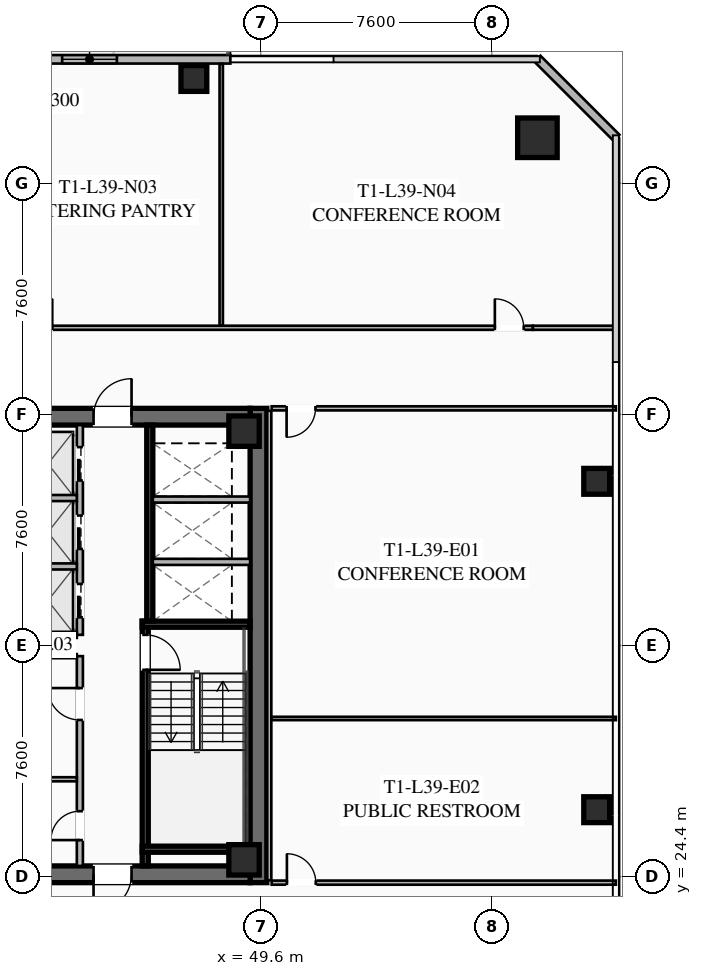
"""IFC4 building model, lengths in metres.
Left out: names, types, materials, properties, quantities, classifications, styles, units other than length and angle.
Written with IfcOpenShell. Run it as: python <this file> out.ifc"""

import sys

from ifc_helpers import new_model, si_unit, direction, frame, frame_2d, origin, origin_2d, place, context, subcontext, project, spatial, rectangle, hollow_rectangle, extrude, element, fill, save


model = new_model("IFC4")
c1 = context("Model", 3, precision=1e-05, world=origin(), true_north=direction((0.0, 1.0)))
c2 = subcontext(c1, "Body", "Model", "MODEL_VIEW")
j1 = project(units=[si_unit("LENGTHUNIT", "METRE"), si_unit("PLANEANGLEUNIT", "RADIAN")], contexts=[c1])
p1 = place(None, origin())
s1 = spatial("IfcSite", under=j1, at=p1, CompositionType="ELEMENT")
p2 = place(p1, origin())
s2 = spatial("IfcBuilding", under=s1, at=p2, CompositionType="ELEMENT")
p3 = place(p2, frame((0.0, 0.0, 146.35)))
s3 = spatial("IfcBuildingStorey", under=s2, at=p3, CompositionType="ELEMENT", Elevation=146.35)
p4 = place(p3, frame((49.525, 39.8, 0.0), z_axis=(0.0, 0.0, 1.0), x_axis=(0.0, -1.0, 0.0)))
e1 = element("IfcWall", 1, at=p4, inside=s3, PredefinedType="SHEAR", context=c2, shape_type="SweptSolid", body=[
    extrude(rectangle(XDim=15.6, YDim=0.55, at=frame_2d((7.8, 0.0))), origin(), (0.0, 0.0, 1.0), 3.55),
])
p5 = place(p3, frame((49.25, 24.475, 0.0), z_axis=(0.0, 0.0, 1.0), x_axis=(-1.0, 0.0, 0.0)))
e2 = element("IfcWall", 2, at=p5, inside=s3, PredefinedType="SHEAR", context=c2, shape_type="SweptSolid", body=[
    extrude(rectangle(XDim=14.5, YDim=0.55, at=frame_2d((7.25, 0.0))), origin(), (0.0, 0.0, 1.0), 3.55),
])
p6 = place(p5, frame((8.95, 0.0, 0.0)))
e3 = element("IfcOpeningElement", 3, at=p6, cuts=e2, PredefinedType="OPENING", context=c2, shape_type="SweptSolid", body=[
    extrude(rectangle(XDim=1.25, YDim=2.25, at=frame_2d((0.625, 1.125))), frame((0.0, 0.285, 0.0), z_axis=(0.0, -1.0, 0.0), x_axis=(1.0, 0.0, 0.0)), (0.0, 0.0, 1.0), 0.57),
])
p7 = place(p5, frame((3.9, 0.0, 0.0)))
e4 = element("IfcOpeningElement", 4, at=p7, cuts=e2, PredefinedType="OPENING", context=c2, shape_type="SweptSolid", body=[
    extrude(rectangle(XDim=1.25, YDim=2.25, at=frame_2d((0.625, 1.125))), frame((0.0, 0.285, 0.0), z_axis=(0.0, -1.0, 0.0), x_axis=(1.0, 0.0, 0.0)), (0.0, 0.0, 1.0), 0.57),
])
p8 = place(p3, frame((34.75, 39.525, 0.0), z_axis=(0.0, 0.0, 1.0), x_axis=(1.0, 0.0, 0.0)))
e5 = element("IfcWall", 5, at=p8, inside=s3, PredefinedType="SHEAR", context=c2, shape_type="SweptSolid", body=[
    extrude(rectangle(XDim=14.5, YDim=0.55, at=frame_2d((7.25, 0.0))), origin(), (0.0, 0.0, 1.0), 3.55),
])
p9 = place(p8, frame((4.3, 0.0, 0.0)))
e6 = element("IfcOpeningElement", 6, at=p9, cuts=e5, PredefinedType="OPENING", context=c2, shape_type="SweptSolid", body=[
    extrude(rectangle(XDim=1.25, YDim=2.25, at=frame_2d((0.625, 1.125))), frame((0.0, 0.285, 0.0), z_axis=(0.0, -1.0, 0.0), x_axis=(1.0, 0.0, 0.0)), (0.0, 0.0, 1.0), 0.57),
])
p10 = place(p8, frame((9.35, 0.0, 0.0)))
e7 = element("IfcOpeningElement", 7, at=p10, cuts=e5, PredefinedType="OPENING", context=c2, shape_type="SweptSolid", body=[
    extrude(rectangle(XDim=1.25, YDim=2.25, at=frame_2d((0.625, 1.125))), frame((0.0, 0.285, 0.0), z_axis=(0.0, -1.0, 0.0), x_axis=(1.0, 0.0, 0.0)), (0.0, 0.0, 1.0), 0.57),
])
for number, where, z_axis, x_axis in (
    (8, (49.05, 24.95, 0.0), (0.0, 0.0, 1.0), (1.0, 0.0, 0.0)),
    (9, (49.05, 39.05, 0.0), (0.0, 0.0, 1.0), (1.0, 0.0, 0.0)),
):
    element("IfcColumn", number, at=place(p3, frame(where, z_axis=z_axis, x_axis=x_axis)), inside=s3, PredefinedType="COLUMN", context=c2, shape_type="SweptSolid", body=[
        extrude(hollow_rectangle(XDim=1.0, YDim=1.0, WallThickness=0.04, at=origin_2d()), origin(), (0.0, 0.0, 1.0), 3.37),
    ])
p11 = place(p3, frame((58.7, 48.7, 0.0), z_axis=(0.0, 0.0, 1.0), x_axis=(1.0, 0.0, 0.0)))
e10 = element("IfcColumn", 10, at=p11, inside=s3, PredefinedType="COLUMN", context=c2, shape_type="SweptSolid", body=[
    extrude(hollow_rectangle(XDim=1.3, YDim=1.3, WallThickness=0.05, at=origin_2d()), origin(), (0.0, 0.0, 1.0), 3.37),
])
for number, where, z_axis, x_axis in (
    (11, (60.65, 26.6, 0.0), (0.0, 0.0, 1.0), (1.0, 0.0, 0.0)),
    (12, (60.65, 37.4, 0.0), (0.0, 0.0, 1.0), (1.0, 0.0, 0.0)),
    (13, (47.4, 50.65, 0.0), (0.0, 0.0, 1.0), (1.0, 0.0, 0.0)),
):
    element("IfcColumn", number, at=place(p3, frame(where, z_axis=z_axis, x_axis=x_axis)), inside=s3, PredefinedType="COLUMN", context=c2, shape_type="SweptSolid", body=[
        extrude(hollow_rectangle(XDim=0.85, YDim=0.85, WallThickness=0.035, at=origin_2d()), origin(), (0.0, 0.0, 1.0), 3.37),
    ])
p12 = place(p3, frame((35.4, 51.28, 0.0), z_axis=(0.0, 0.0, 1.0), x_axis=(1.0, 0.0, 0.0)))
e14 = element("IfcWall", 14, at=p12, inside=s3, PredefinedType="SOLIDWALL", context=c2, shape_type="SweptSolid", body=[
    extrude(rectangle(XDim=13.2, YDim=0.28, at=frame_2d((6.6, 0.0))), origin(), (0.0, 0.0, 1.0), 3.37),
])
p13 = place(p12, frame((5.95, 0.0, 0.0)))
e15 = element("IfcOpeningElement", 15, at=p13, cuts=e14, PredefinedType="OPENING", context=c2, shape_type="SweptSolid", body=[
    extrude(rectangle(XDim=1.3, YDim=2.15, at=frame_2d((0.65, 1.075))), frame((0.0, 0.15, 0.0), z_axis=(0.0, -1.0, 0.0), x_axis=(1.0, 0.0, 0.0)), (0.0, 0.0, 1.0), 0.3),
])
p14 = place(p12, frame((7.668, 0.0, 0.85)))
e16 = element("IfcOpeningElement", 16, at=p14, cuts=e14, PredefinedType="OPENING", context=c2, shape_type="SweptSolid", body=[
    extrude(rectangle(XDim=1.8, YDim=1.92, at=frame_2d((0.9, 0.96))), frame((0.0, 0.15, 0.0), z_axis=(0.0, -1.0, 0.0), x_axis=(1.0, 0.0, 0.0)), (0.0, 0.0, 1.0), 0.3),
])
p15 = place(p3, frame((58.7, 51.3, 0.0), z_axis=(0.0, 0.0, 1.0), x_axis=(0.707106781187, -0.707106781187, 0.0)))
e17 = element("IfcWall", 17, at=p15, inside=s3, PredefinedType="SOLIDWALL", context=c2, shape_type="SweptSolid", body=[
    extrude(rectangle(XDim=3.677, YDim=0.28, at=frame_2d((1.838, 0.0))), origin(), (0.0, 0.0, 1.0), 3.37),
])
p16 = place(p3, frame((45.8, 32.8, 0.0), z_axis=(0.0, 0.0, 1.0), x_axis=(0.0, -1.0, 0.0)))
e18 = element("IfcWall", 18, at=p16, inside=s3, PredefinedType="SHEAR", context=c2, shape_type="SweptSolid", body=[
    extrude(rectangle(XDim=8.05, YDim=0.2, at=frame_2d((4.025, 0.0))), origin(), (0.0, 0.0, 1.0), 3.37),
])
p17 = place(p16, frame((0.45, 0.0, 0.0)))
e19 = element("IfcOpeningElement", 19, at=p17, cuts=e18, PredefinedType="OPENING", context=c2, shape_type="SweptSolid", body=[
    extrude(rectangle(XDim=1.15, YDim=2.2, at=frame_2d((0.575, 1.1))), frame((0.0, 0.11, 0.0), z_axis=(0.0, -1.0, 0.0), x_axis=(1.0, 0.0, 0.0)), (0.0, 0.0, 1.0), 0.22),
])
for number, where, z_axis, x_axis in (
    (20, (45.7, 32.7, 0.0), (0.0, 0.0, 1.0), (1.0, 0.0, 0.0)),
    (21, (45.7, 25.3, 0.0), (0.0, 0.0, 1.0), (1.0, 0.0, 0.0)),
):
    element("IfcWall", number, at=place(p3, frame(where, z_axis=z_axis, x_axis=x_axis)), inside=s3, PredefinedType="SHEAR", context=c2, shape_type="SweptSolid", body=[
        extrude(rectangle(XDim=3.55, YDim=0.2, at=frame_2d((1.775, 0.0))), origin(), (0.0, 0.0, 1.0), 3.37),
    ])
p18 = place(p3, frame((45.95, 39.25, 0.0), z_axis=(0.0, 0.0, 1.0), x_axis=(0.0, -1.0, 0.0)))
e22 = element("IfcWall", 22, at=p18, inside=s3, PredefinedType="SHEAR", context=c2, shape_type="SweptSolid", body=[
    extrude(rectangle(XDim=6.45, YDim=0.2, at=frame_2d((3.225, 0.0))), origin(), (0.0, 0.0, 1.0), 3.37),
])
for number, where, z_axis, x_axis in (
    (23, (46.05, 34.75, 0.0), (0.0, 0.0, 1.0), (1.0, 0.0, 0.0)),
    (24, (46.05, 36.8, 0.0), (0.0, 0.0, 1.0), (1.0, 0.0, 0.0)),
):
    element("IfcWall", number, at=place(p3, frame(where, z_axis=z_axis, x_axis=x_axis)), inside=s3, PredefinedType="SOLIDWALL", context=c2, shape_type="SweptSolid", body=[
        extrude(rectangle(XDim=3.2, YDim=0.2, at=frame_2d((1.6, 0.0))), origin(), (0.0, 0.0, 1.0), 3.37),
    ])
p19 = place(p3, frame((43.65, 24.75, 0.0), z_axis=(0.0, 0.0, 1.0), x_axis=(0.0, 1.0, 0.0)))
e25 = element("IfcWall", 25, at=p19, inside=s3, PredefinedType="SOLIDWALL", context=c2, shape_type="SweptSolid", body=[
    extrude(rectangle(XDim=6.9, YDim=0.2, at=frame_2d((3.45, 0.0))), origin(), (0.0, 0.0, 1.0), 2.723),
])
p20 = place(p19, frame((0.85, 0.0, 0.0)))
e26 = element("IfcOpeningElement", 26, at=p20, cuts=e25, PredefinedType="OPENING", context=c2, shape_type="SweptSolid", body=[
    extrude(rectangle(XDim=0.95, YDim=2.05, at=frame_2d((0.475, 1.025))), frame((0.0, 0.11, 0.0), z_axis=(0.0, -1.0, 0.0), x_axis=(1.0, 0.0, 0.0)), (0.0, 0.0, 1.0), 0.22),
])
p21 = place(p19, frame((4.8, 0.0, 0.0)))
e27 = element("IfcOpeningElement", 27, at=p21, cuts=e25, PredefinedType="OPENING", context=c2, shape_type="SweptSolid", body=[
    extrude(rectangle(XDim=1.05, YDim=2.2, at=frame_2d((0.525, 1.1))), frame((0.0, 0.11, 0.0), z_axis=(0.0, -1.0, 0.0), x_axis=(1.0, 0.0, 0.0)), (0.0, 0.0, 1.0), 0.22),
])
for number, where, z_axis, x_axis in (
    (28, (41.67, 31.65, 0.0), (0.0, 0.0, 1.0), (1.0, 0.0, 0.0)),
    (29, (41.67, 27.6, 0.0), (0.0, 0.0, 1.0), (1.0, 0.0, 0.0)),
):
    element("IfcWall", number, at=place(p3, frame(where, z_axis=z_axis, x_axis=x_axis)), inside=s3, PredefinedType="PARTITIONING", context=c2, shape_type="SweptSolid", body=[
        extrude(rectangle(XDim=1.88, YDim=0.135, at=frame_2d((0.94, 0.0))), origin(), (0.0, 0.0, 1.0), 2.723),
    ])
p22 = place(p3, frame((43.65, 32.35, 0.0), z_axis=(0.0, 0.0, 1.0), x_axis=(0.0, 1.0, 0.0)))
e30 = element("IfcWall", 30, at=p22, inside=s3, PredefinedType="SOLIDWALL", context=c2, shape_type="SweptSolid", body=[
    extrude(rectangle(XDim=6.9, YDim=0.2, at=frame_2d((3.45, 0.0))), origin(), (0.0, 0.0, 1.0), 3.37),
])
p23 = place(p22, frame((0.575, 0.0, 0.0)))
e31 = element("IfcOpeningElement", 31, at=p23, cuts=e30, PredefinedType="OPENING", context=c2, shape_type="SweptSolid", body=[
    extrude(rectangle(XDim=1.1, YDim=2.2, at=frame_2d((0.55, 1.1))), frame((0.0, 0.11, 0.0), z_axis=(0.0, -1.0, 0.0), x_axis=(1.0, 0.0, 0.0)), (0.0, 0.0, 1.0), 0.22),
])
p24 = place(p22, frame((2.825, 0.0, 0.0)))
e32 = element("IfcOpeningElement", 32, at=p24, cuts=e30, PredefinedType="OPENING", context=c2, shape_type="SweptSolid", body=[
    extrude(rectangle(XDim=1.1, YDim=2.2, at=frame_2d((0.55, 1.1))), frame((0.0, 0.11, 0.0), z_axis=(0.0, -1.0, 0.0), x_axis=(1.0, 0.0, 0.0)), (0.0, 0.0, 1.0), 0.22),
])
p25 = place(p22, frame((5.075, 0.0, 0.0)))
e33 = element("IfcOpeningElement", 33, at=p25, cuts=e30, PredefinedType="OPENING", context=c2, shape_type="SweptSolid", body=[
    extrude(rectangle(XDim=1.1, YDim=2.2, at=frame_2d((0.55, 1.1))), frame((0.0, 0.11, 0.0), z_axis=(0.0, -1.0, 0.0), x_axis=(1.0, 0.0, 0.0)), (0.0, 0.0, 1.0), 0.22),
])
for number, where, z_axis, x_axis in (
    (34, (41.67, 32.35, 0.0), (0.0, 0.0, 1.0), (1.0, 0.0, 0.0)),
    (35, (41.67, 34.6, 0.0), (0.0, 0.0, 1.0), (1.0, 0.0, 0.0)),
    (36, (41.67, 36.85, 0.0), (0.0, 0.0, 1.0), (1.0, 0.0, 0.0)),
):
    element("IfcWall", number, at=place(p3, frame(where, z_axis=z_axis, x_axis=x_axis)), inside=s3, PredefinedType="SOLIDWALL", context=c2, shape_type="SweptSolid", body=[
        extrude(rectangle(XDim=1.88, YDim=0.2, at=frame_2d((0.94, 0.0))), origin(), (0.0, 0.0, 1.0), 3.37),
    ])
p26 = place(p3, frame((25.45, 42.45, 0.0), z_axis=(0.0, 0.0, 1.0), x_axis=(1.0, 0.0, 0.0)))
e37 = element("IfcWall", 37, at=p26, inside=s3, PredefinedType="PARTITIONING", context=c2, shape_type="SweptSolid", body=[
    extrude(rectangle(XDim=33.1, YDim=0.135, at=frame_2d((16.55, 0.0))), origin(), (0.0, 0.0, 1.0), 2.723),
])
p27 = place(p26, frame((0.3, 0.0, 0.0)))
e38 = element("IfcOpeningElement", 38, at=p27, cuts=e37, PredefinedType="OPENING", context=c2, shape_type="SweptSolid", body=[
    extrude(rectangle(XDim=0.95, YDim=2.05, at=frame_2d((0.475, 1.025))), frame((0.0, 0.077, 0.0), z_axis=(0.0, -1.0, 0.0), x_axis=(1.0, 0.0, 0.0)), (0.0, 0.0, 1.0), 0.155),
])
p28 = place(p26, frame((12.315, 0.0, 0.0)))
e39 = element("IfcOpeningElement", 39, at=p28, cuts=e37, PredefinedType="OPENING", context=c2, shape_type="SweptSolid", body=[
    extrude(rectangle(XDim=0.95, YDim=2.05, at=frame_2d((0.475, 1.025))), frame((0.0, 0.077, 0.0), z_axis=(0.0, -1.0, 0.0), x_axis=(1.0, 0.0, 0.0)), (0.0, 0.0, 1.0), 0.155),
])
p29 = place(p26, frame((16.342, 0.0, 0.0)))
e40 = element("IfcOpeningElement", 40, at=p29, cuts=e37, PredefinedType="OPENING", context=c2, shape_type="SweptSolid", body=[
    extrude(rectangle(XDim=0.95, YDim=2.05, at=frame_2d((0.475, 1.025))), frame((0.0, 0.077, 0.0), z_axis=(0.0, -1.0, 0.0), x_axis=(1.0, 0.0, 0.0)), (0.0, 0.0, 1.0), 0.155),
])
p30 = place(p26, frame((31.85, 0.0, 0.0)))
e41 = element("IfcOpeningElement", 41, at=p30, cuts=e37, PredefinedType="OPENING", context=c2, shape_type="SweptSolid", body=[
    extrude(rectangle(XDim=0.95, YDim=2.05, at=frame_2d((0.475, 1.025))), frame((0.0, 0.077, 0.0), z_axis=(0.0, -1.0, 0.0), x_axis=(1.0, 0.0, 0.0)), (0.0, 0.0, 1.0), 0.155),
])
p31 = place(p3, frame((58.55, 42.45, 0.0), z_axis=(0.0, 0.0, 1.0), x_axis=(1.0, 0.0, 0.0)))
e42 = element("IfcWall", 42, at=p31, inside=s3, PredefinedType="PARTITIONING", context=c2, shape_type="SweptSolid", body=[
    extrude(rectangle(XDim=2.73, YDim=0.135, at=frame_2d((1.365, 0.0))), origin(), (0.0, 0.0, 1.0), 2.723),
])
p32 = place(p3, frame((48.3, 42.53, 0.0), z_axis=(0.0, 0.0, 1.0), x_axis=(0.0, 1.0, 0.0)))
e43 = element("IfcWall", 43, at=p32, inside=s3, PredefinedType="PARTITIONING", context=c2, shape_type="SweptSolid", body=[
    extrude(rectangle(XDim=8.6, YDim=0.11, at=frame_2d((4.3, 0.0))), origin(), (0.0, 0.0, 1.0), 2.723),
])
p33 = place(p3, frame((49.88, 39.72, 0.0), z_axis=(0.0, 0.0, 1.0), x_axis=(0.0, -1.0, 0.0)))
e44 = element("IfcWall", 44, at=p33, inside=s3, PredefinedType="PARTITIONING", context=c2, shape_type="SweptSolid", body=[
    extrude(rectangle(XDim=15.44, YDim=0.135, at=frame_2d((7.72, 0.0))), origin(), (0.0, 0.0, 1.0), 2.723),
])
p34 = place(p3, frame((61.28, 39.8, 0.0), z_axis=(0.0, 0.0, 1.0), x_axis=(-1.0, 0.0, 0.0)))
e45 = element("IfcWall", 45, at=p34, inside=s3, PredefinedType="PARTITIONING", context=c2, shape_type="SweptSolid", body=[
    extrude(rectangle(XDim=11.32, YDim=0.135, at=frame_2d((5.66, 0.0))), origin(), (0.0, 0.0, 1.0), 2.723),
])
p35 = place(p34, frame((9.88, 0.0, 0.0)))
e46 = element("IfcOpeningElement", 46, at=p35, cuts=e45, PredefinedType="OPENING", context=c2, shape_type="SweptSolid", body=[
    extrude(rectangle(XDim=0.95, YDim=2.05, at=frame_2d((0.475, 1.025))), frame((0.0, 0.077, 0.0), z_axis=(0.0, -1.0, 0.0), x_axis=(1.0, 0.0, 0.0)), (0.0, 0.0, 1.0), 0.155),
])
p36 = place(p3, frame((49.96, 24.2, 0.0), z_axis=(0.0, 0.0, 1.0), x_axis=(1.0, 0.0, 0.0)))
e47 = element("IfcWall", 47, at=p36, inside=s3, PredefinedType="PARTITIONING", context=c2, shape_type="SweptSolid", body=[
    extrude(rectangle(XDim=11.32, YDim=0.135, at=frame_2d((5.66, 0.0))), origin(), (0.0, 0.0, 1.0), 2.723),
])
p37 = place(p36, frame((0.5, 0.0, 0.0)))
e48 = element("IfcOpeningElement", 48, at=p37, cuts=e47, PredefinedType="OPENING", context=c2, shape_type="SweptSolid", body=[
    extrude(rectangle(XDim=0.95, YDim=2.05, at=frame_2d((0.475, 1.025))), frame((0.0, 0.077, 0.0), z_axis=(0.0, -1.0, 0.0), x_axis=(1.0, 0.0, 0.0)), (0.0, 0.0, 1.0), 0.155),
])
p38 = place(p3, frame((49.96, 29.6, 0.0), z_axis=(0.0, 0.0, 1.0), x_axis=(1.0, 0.0, 0.0)))
e49 = element("IfcWall", 49, at=p38, inside=s3, PredefinedType="PARTITIONING", context=c2, shape_type="SweptSolid", body=[
    extrude(rectangle(XDim=11.32, YDim=0.11, at=frame_2d((5.66, 0.0))), origin(), (0.0, 0.0, 1.0), 2.723),
])
p39 = place(p14, origin())
e50 = element("IfcWindow", 50, at=p39, inside=s3, PartitioningType="SINGLE_PANEL", PredefinedType="WINDOW", context=c2, shape_type="SweptSolid", body=[
    extrude(rectangle(XDim=1.8, YDim=1.92, at=frame_2d((0.9, 0.96))), frame((0.0, 0.03, 0.0), z_axis=(0.0, -1.0, 0.0), x_axis=(1.0, 0.0, 0.0)), (0.0, 0.0, 1.0), 0.06),
])
fill(e16, e50)
p40 = place(p10, origin())
e51 = element("IfcDoor", 51, at=p40, inside=s3, OperationType="SINGLE_SWING_RIGHT", PredefinedType="DOOR", context=c2, shape_type="SweptSolid", body=[
    extrude(rectangle(XDim=1.25, YDim=2.25, at=frame_2d((0.625, 1.125))), frame((0.0, 0.025, 0.0), z_axis=(0.0, -1.0, 0.0), x_axis=(1.0, 0.0, 0.0)), (0.0, 0.0, 1.0), 0.05),
])
fill(e7, e51)
p41 = place(p7, origin())
e52 = element("IfcDoor", 52, at=p41, inside=s3, OperationType="SINGLE_SWING_RIGHT", PredefinedType="DOOR", context=c2, shape_type="SweptSolid", body=[
    extrude(rectangle(XDim=1.25, YDim=2.25, at=frame_2d((0.625, 1.125))), frame((0.0, 0.025, 0.0), z_axis=(0.0, -1.0, 0.0), x_axis=(1.0, 0.0, 0.0)), (0.0, 0.0, 1.0), 0.05),
])
fill(e4, e52)
p42 = place(p17, origin())
e53 = element("IfcDoor", 53, at=p42, inside=s3, OperationType="SINGLE_SWING_RIGHT", PredefinedType="DOOR", context=c2, shape_type="SweptSolid", body=[
    extrude(rectangle(XDim=1.15, YDim=2.2, at=frame_2d((0.575, 1.1))), frame((0.0, 0.025, 0.0), z_axis=(0.0, -1.0, 0.0), x_axis=(1.0, 0.0, 0.0)), (0.0, 0.0, 1.0), 0.05),
])
fill(e19, e53)
p43 = place(p20, origin())
e54 = element("IfcDoor", 54, at=p43, inside=s3, OperationType="SINGLE_SWING_LEFT", PredefinedType="DOOR", context=c2, shape_type="SweptSolid", body=[
    extrude(rectangle(XDim=0.95, YDim=2.05, at=frame_2d((0.475, 1.025))), frame((0.0, 0.025, 0.0), z_axis=(0.0, -1.0, 0.0), x_axis=(1.0, 0.0, 0.0)), (0.0, 0.0, 1.0), 0.05),
])
fill(e26, e54)
p44 = place(p21, origin())
e55 = element("IfcDoor", 55, at=p44, inside=s3, OperationType="SINGLE_SWING_RIGHT", PredefinedType="DOOR", context=c2, shape_type="SweptSolid", body=[
    extrude(rectangle(XDim=1.05, YDim=2.2, at=frame_2d((0.525, 1.1))), frame((0.0, 0.025, 0.0), z_axis=(0.0, -1.0, 0.0), x_axis=(1.0, 0.0, 0.0)), (0.0, 0.0, 1.0), 0.05),
])
fill(e27, e55)
p45 = place(p30, origin())
e56 = element("IfcDoor", 56, at=p45, inside=s3, OperationType="SINGLE_SWING_LEFT", PredefinedType="DOOR", context=c2, shape_type="SweptSolid", body=[
    extrude(rectangle(XDim=0.95, YDim=2.05, at=frame_2d((0.475, 1.025))), frame((0.0, 0.025, 0.0), z_axis=(0.0, -1.0, 0.0), x_axis=(1.0, 0.0, 0.0)), (0.0, 0.0, 1.0), 0.05),
])
fill(e41, e56)
p46 = place(p35, origin())
e57 = element("IfcDoor", 57, at=p46, inside=s3, OperationType="SINGLE_SWING_RIGHT", PredefinedType="DOOR", context=c2, shape_type="SweptSolid", body=[
    extrude(rectangle(XDim=0.95, YDim=2.05, at=frame_2d((0.475, 1.025))), frame((0.0, 0.025, 0.0), z_axis=(0.0, -1.0, 0.0), x_axis=(1.0, 0.0, 0.0)), (0.0, 0.0, 1.0), 0.05),
])
fill(e46, e57)
p47 = place(p37, origin())
e58 = element("IfcDoor", 58, at=p47, inside=s3, OperationType="SINGLE_SWING_LEFT", PredefinedType="DOOR", context=c2, shape_type="SweptSolid", body=[
    extrude(rectangle(XDim=0.95, YDim=2.05, at=frame_2d((0.475, 1.025))), frame((0.0, 0.025, 0.0), z_axis=(0.0, -1.0, 0.0), x_axis=(1.0, 0.0, 0.0)), (0.0, 0.0, 1.0), 0.05),
])
fill(e48, e58)
p48 = place(p23, origin())
e59 = element("IfcDoor", 59, at=p48, inside=s3, OperationType="SLIDING_TO_LEFT", PredefinedType="DOOR", context=c2, shape_type="SweptSolid", body=[
    extrude(rectangle(XDim=1.1, YDim=2.2, at=frame_2d((0.55, 1.1))), frame((0.0, 0.025, 0.0), z_axis=(0.0, -1.0, 0.0), x_axis=(1.0, 0.0, 0.0)), (0.0, 0.0, 1.0), 0.05),
])
fill(e31, e59)
p49 = place(p24, origin())
e60 = element("IfcDoor", 60, at=p49, inside=s3, OperationType="SLIDING_TO_LEFT", PredefinedType="DOOR", context=c2, shape_type="SweptSolid", body=[
    extrude(rectangle(XDim=1.1, YDim=2.2, at=frame_2d((0.55, 1.1))), frame((0.0, 0.025, 0.0), z_axis=(0.0, -1.0, 0.0), x_axis=(1.0, 0.0, 0.0)), (0.0, 0.0, 1.0), 0.05),
])
fill(e32, e60)
p50 = place(p25, origin())
e61 = element("IfcDoor", 61, at=p50, inside=s3, OperationType="SLIDING_TO_LEFT", PredefinedType="DOOR", context=c2, shape_type="SweptSolid", body=[
    extrude(rectangle(XDim=1.1, YDim=2.2, at=frame_2d((0.55, 1.1))), frame((0.0, 0.025, 0.0), z_axis=(0.0, -1.0, 0.0), x_axis=(1.0, 0.0, 0.0)), (0.0, 0.0, 1.0), 0.05),
])
fill(e33, e61)
save(model, sys.argv[1])
